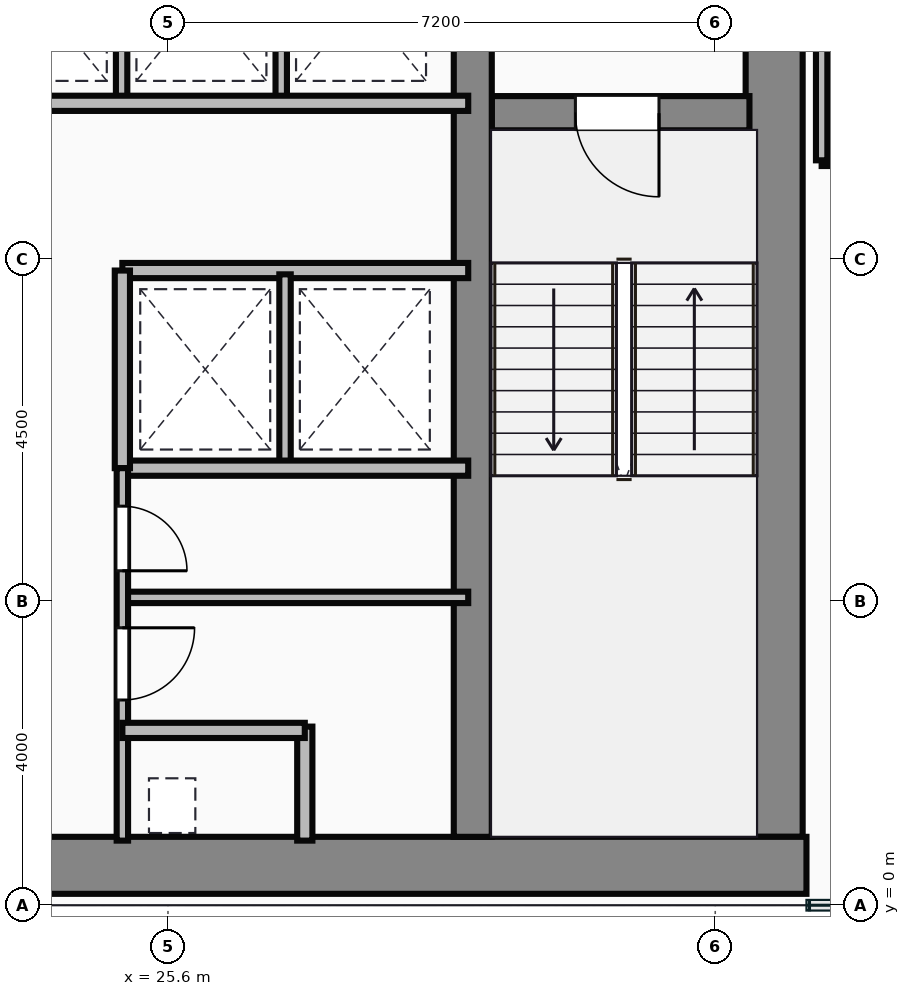
"""IFC4 building model, lengths in metres.
Left out: names, types, materials, properties, quantities, classifications, styles, units other than length and angle.
Written with IfcOpenShell. Run it as: python <this file> out.ifc"""

import sys

from ifc_helpers import new_model, si_unit, direction, frame, frame_2d, origin, place, context, subcontext, project, spatial, rectangle, extrude, source, transform, mapped, element, fill, save


model = new_model("IFC4")
c1 = context("Model", 3, precision=1e-05, world=origin(), true_north=direction((0.0, 1.0)))
c2 = subcontext(c1, "Body", "Model", "MODEL_VIEW")
j1 = project(units=[si_unit("LENGTHUNIT", "METRE"), si_unit("PLANEANGLEUNIT", "RADIAN")], contexts=[c1])
p1 = place(None, origin())
s1 = spatial("IfcSite", under=j1, at=p1, CompositionType="ELEMENT")
p2 = place(p1, origin())
s2 = spatial("IfcBuilding", under=s1, at=p2, CompositionType="ELEMENT")
p3 = place(p2, frame((0.0, 0.0, 103.25)))
s3 = spatial("IfcBuildingStorey", under=s2, at=p3, CompositionType="ELEMENT", Elevation=103.25)
m1 = source(origin(), c2, "Body", "SweptSolid", [
    extrude(rectangle(XDim=29.5, YDim=0.75, at=frame_2d((14.75, 0.0))), origin(), (0.0, 0.0, 1.0), 3.65),
])
p4 = place(p3, frame((4.5, 0.525, 0.0), z_axis=(0.0, 0.0, 1.0), x_axis=(1.0, 0.0, 0.0)))
e1 = element("IfcWall", 1, at=p4, inside=s3, PredefinedType="SHEAR", context=c2, shape_type="MappedRepresentation", body=[
    mapped(m1, transform((0.0, 0.0, 0.0))),
])
m2 = source(origin(), c2, "Body", "SweptSolid", [
    extrude(rectangle(XDim=13.1, YDim=0.75, at=frame_2d((6.55, 0.0))), origin(), (0.0, 0.0, 1.0), 3.65),
])
p5 = place(p3, frame((33.575, 0.9, 0.0), z_axis=(0.0, 0.0, 1.0), x_axis=(0.0, 1.0, 0.0)))
e2 = element("IfcWall", 2, at=p5, inside=s3, PredefinedType="SHEAR", context=c2, shape_type="MappedRepresentation", body=[
    mapped(m2, transform((0.0, 0.0, 0.0))),
])
m3 = source(origin(), c2, "Body", "SweptSolid", [
    extrude(rectangle(XDim=12.35, YDim=0.5, at=frame_2d((6.175, 0.0))), origin(), (0.0, 0.0, 1.0), 3.65),
])
p6 = place(p3, frame((29.61, 0.9, 0.0), z_axis=(0.0, 0.0, 1.0), x_axis=(0.0, 1.0, 0.0)))
e3 = element("IfcWall", 3, at=p6, inside=s3, PredefinedType="SHEAR", context=c2, shape_type="MappedRepresentation", body=[
    mapped(m3, transform((0.0, 0.0, 0.0))),
])
m4 = source(origin(), c2, "Body", "SweptSolid", [
    extrude(rectangle(XDim=3.39, YDim=0.45, at=frame_2d((1.695, 0.0))), origin(), (0.0, 0.0, 1.0), 3.65),
])
p7 = place(p3, frame((29.86, 10.42, 0.0), z_axis=(0.0, 0.0, 1.0), x_axis=(1.0, 0.0, 0.0)))
e4 = element("IfcWall", 4, at=p7, inside=s3, PredefinedType="SHEAR", context=c2, shape_type="MappedRepresentation", body=[
    mapped(m4, transform((0.0, 0.0, 0.0))),
])
p8 = place(p7, frame((1.1, 0.0, 0.0)))
e5 = element("IfcOpeningElement", 5, at=p8, cuts=e4, PredefinedType="OPENING", context=c2, shape_type="SweptSolid", body=[
    extrude(rectangle(XDim=1.1, YDim=2.15, at=frame_2d((0.55, 1.075))), frame((0.0, 0.235, 0.0), z_axis=(0.0, -1.0, 0.0), x_axis=(1.0, 0.0, 0.0)), (0.0, 0.0, 1.0), 0.47),
])
m5 = source(origin(), c2, "Body", "SweptSolid", [
    extrude(rectangle(XDim=8.8, YDim=0.2, at=frame_2d((4.4, 0.0))), origin(), (0.0, 0.0, 1.0), 3.4),
])
p9 = place(p3, frame((20.75, 10.55, 0.0), z_axis=(0.0, 0.0, 1.0), x_axis=(1.0, 0.0, 0.0)))
e6 = element("IfcWall", 6, at=p9, inside=s3, PredefinedType="PARTITIONING", context=c2, shape_type="MappedRepresentation", body=[
    mapped(m5, transform((0.0, 0.0, 0.0))),
])
m6 = source(origin(), c2, "Body", "SweptSolid", [
    extrude(rectangle(XDim=2.85, YDim=0.15, at=frame_2d((1.425, 0.0))), origin(), (0.0, 0.0, 1.0), 3.4),
])
for number, where, z_axis, x_axis in (
    (7, (24.99, 10.6, 0.0), (0.0, 0.0, 1.0), (0.0, 1.0, 0.0)),
    (8, (27.09, 10.6, 0.0), (0.0, 0.0, 1.0), (0.0, 1.0, 0.0)),
):
    element("IfcWall", number, at=place(p3, frame(where, z_axis=z_axis, x_axis=x_axis)), inside=s3, PredefinedType="PARTITIONING", context=c2, shape_type="MappedRepresentation", body=[
        mapped(m6, transform((0.0, 0.0, 0.0))),
    ])
m7 = source(origin(), c2, "Body", "SweptSolid", [
    extrude(rectangle(XDim=4.55, YDim=0.2, at=frame_2d((2.275, 0.0))), origin(), (0.0, 0.0, 1.0), 3.4),
])
for number, where, z_axis, x_axis in (
    (9, (25.0, 8.35, 0.0), (0.0, 0.0, 1.0), (1.0, 0.0, 0.0)),
    (10, (25.0, 5.75, 0.0), (0.0, 0.0, 1.0), (1.0, 0.0, 0.0)),
):
    element("IfcWall", number, at=place(p3, frame(where, z_axis=z_axis, x_axis=x_axis)), inside=s3, PredefinedType="PARTITIONING", context=c2, shape_type="MappedRepresentation", body=[
        mapped(m7, transform((0.0, 0.0, 0.0))),
    ])
m8 = source(origin(), c2, "Body", "SweptSolid", [
    extrude(rectangle(XDim=2.6, YDim=0.2, at=frame_2d((1.3, 0.0))), origin(), (0.0, 0.0, 1.0), 3.4),
])
p10 = place(p3, frame((25.0, 5.75, 0.0), z_axis=(0.0, 0.0, 1.0), x_axis=(0.0, 1.0, 0.0)))
e11 = element("IfcWall", 11, at=p10, inside=s3, PredefinedType="PARTITIONING", context=c2, shape_type="MappedRepresentation", body=[
    mapped(m8, transform((0.0, 0.0, 0.0))),
])
m9 = source(origin(), c2, "Body", "SweptSolid", [
    extrude(rectangle(XDim=2.5, YDim=0.15, at=frame_2d((1.25, 0.0))), origin(), (0.0, 0.0, 1.0), 3.4),
])
p11 = place(p3, frame((27.14, 5.8, 0.0), z_axis=(0.0, 0.0, 1.0), x_axis=(0.0, 1.0, 0.0)))
e12 = element("IfcWall", 12, at=p11, inside=s3, PredefinedType="PARTITIONING", context=c2, shape_type="MappedRepresentation", body=[
    mapped(m9, transform((0.0, 0.0, 0.0))),
])
m10 = source(origin(), c2, "Body", "SweptSolid", [
    extrude(rectangle(XDim=4.9, YDim=0.15, at=frame_2d((2.45, 0.0))), origin(), (0.0, 0.0, 1.0), 3.4),
])
p12 = place(p3, frame((25.0, 0.85, 0.0), z_axis=(0.0, 0.0, 1.0), x_axis=(0.0, 1.0, 0.0)))
e13 = element("IfcWall", 13, at=p12, inside=s3, PredefinedType="PARTITIONING", context=c2, shape_type="MappedRepresentation", body=[
    mapped(m10, transform((0.0, 0.0, 0.0))),
])
p13 = place(p12, frame((1.85, 0.0, 0.0)))
e14 = element("IfcOpeningElement", 14, at=p13, cuts=e13, PredefinedType="OPENING", context=c2, shape_type="SweptSolid", body=[
    extrude(rectangle(XDim=0.95, YDim=2.15, at=frame_2d((0.475, 1.075))), frame((0.0, 0.085, 0.0), z_axis=(0.0, -1.0, 0.0), x_axis=(1.0, 0.0, 0.0)), (0.0, 0.0, 1.0), 0.17),
])
p14 = place(p12, frame((3.55, 0.0, 0.0)))
e15 = element("IfcOpeningElement", 15, at=p14, cuts=e13, PredefinedType="OPENING", context=c2, shape_type="SweptSolid", body=[
    extrude(rectangle(XDim=0.85, YDim=2.15, at=frame_2d((0.425, 1.075))), frame((0.0, 0.085, 0.0), z_axis=(0.0, -1.0, 0.0), x_axis=(1.0, 0.0, 0.0)), (0.0, 0.0, 1.0), 0.17),
])
m11 = source(origin(), c2, "Body", "SweptSolid", [
    extrude(rectangle(XDim=2.4, YDim=0.2, at=frame_2d((1.2, 0.0))), origin(), (0.0, 0.0, 1.0), 3.4),
])
p15 = place(p3, frame((25.0, 2.3, 0.0), z_axis=(0.0, 0.0, 1.0), x_axis=(1.0, 0.0, 0.0)))
e16 = element("IfcWall", 16, at=p15, inside=s3, PredefinedType="PARTITIONING", context=c2, shape_type="MappedRepresentation", body=[
    mapped(m11, transform((0.0, 0.0, 0.0))),
])
m12 = source(origin(), c2, "Body", "SweptSolid", [
    extrude(rectangle(XDim=1.5, YDim=0.2, at=frame_2d((0.75, 0.0))), origin(), (0.0, 0.0, 1.0), 3.4),
])
p16 = place(p3, frame((27.4, 0.85, 0.0), z_axis=(0.0, 0.0, 1.0), x_axis=(0.0, 1.0, 0.0)))
e17 = element("IfcWall", 17, at=p16, inside=s3, PredefinedType="PARTITIONING", context=c2, shape_type="MappedRepresentation", body=[
    mapped(m12, transform((0.0, 0.0, 0.0))),
])
m13 = source(origin(), c2, "Body", "SweptSolid", [
    extrude(rectangle(XDim=4.55, YDim=0.15, at=frame_2d((2.275, 0.0))), origin(), (0.0, 0.0, 1.0), 3.4),
])
p17 = place(p3, frame((25.0, 4.05, 0.0), z_axis=(0.0, 0.0, 1.0), x_axis=(1.0, 0.0, 0.0)))
e18 = element("IfcWall", 18, at=p17, inside=s3, PredefinedType="PARTITIONING", context=c2, shape_type="MappedRepresentation", body=[
    mapped(m13, transform((0.0, 0.0, 0.0))),
])
m14 = source(origin(), c2, "Body", "SweptSolid", [
    extrude(rectangle(XDim=4.8, YDim=0.15, at=frame_2d((2.4, 0.0))), origin(), (0.0, 0.0, 1.0), 3.4),
])
p18 = place(p3, frame((34.2, 9.8, 0.0), z_axis=(0.0, 0.0, 1.0), x_axis=(1.0, 0.0, 0.0)))
e19 = element("IfcWall", 19, at=p18, inside=s3, PredefinedType="PARTITIONING", context=c2, shape_type="MappedRepresentation", body=[
    mapped(m14, transform((0.0, 0.0, 0.0))),
])
m15 = source(origin(), c2, "Body", "SweptSolid", [
    extrude(rectangle(XDim=4.18, YDim=0.15, at=frame_2d((2.09, 0.0))), origin(), (0.0, 0.0, 1.0), 3.4),
])
p19 = place(p3, frame((34.2, 9.8, 0.0), z_axis=(0.0, 0.0, 1.0), x_axis=(0.0, 1.0, 0.0)))
e20 = element("IfcWall", 20, at=p19, inside=s3, PredefinedType="PARTITIONING", context=c2, shape_type="MappedRepresentation", body=[
    mapped(m15, transform((0.0, 0.0, 0.0))),
])
m16 = source(origin(), c2, "Body", "SweptSolid", [
    extrude(rectangle(XDim=1.1, YDim=2.15, at=frame_2d((0.55, 1.075))), frame((0.0, 0.025, 0.0), z_axis=(0.0, -1.0, 0.0), x_axis=(1.0, 0.0, 0.0)), (0.0, 0.0, 1.0), 0.05),
])
p20 = place(p8, frame((1.1, 0.0, 0.0), z_axis=(0.0, 0.0, 1.0), x_axis=(-1.0, 0.0, 0.0)))
e21 = element("IfcDoor", 21, at=p20, inside=s3, OperationType="SINGLE_SWING_RIGHT", PredefinedType="DOOR", context=c2, shape_type="MappedRepresentation", body=[
    mapped(m16, transform((0.0, 0.0, 0.0))),
])
fill(e5, e21)
m17 = source(origin(), c2, "Body", "SweptSolid", [
    extrude(rectangle(XDim=0.95, YDim=2.15, at=frame_2d((0.475, 1.075))), frame((0.0, 0.025, 0.0), z_axis=(0.0, -1.0, 0.0), x_axis=(1.0, 0.0, 0.0)), (0.0, 0.0, 1.0), 0.05),
])
p21 = place(p13, origin())
e22 = element("IfcDoor", 22, at=p21, inside=s3, OperationType="SINGLE_SWING_RIGHT", PredefinedType="DOOR", context=c2, shape_type="MappedRepresentation", body=[
    mapped(m17, transform((0.0, 0.0, 0.0))),
])
fill(e14, e22)
m18 = source(origin(), c2, "Body", "SweptSolid", [
    extrude(rectangle(XDim=0.85, YDim=2.15, at=frame_2d((0.425, 1.075))), frame((0.0, 0.025, 0.0), z_axis=(0.0, -1.0, 0.0), x_axis=(1.0, 0.0, 0.0)), (0.0, 0.0, 1.0), 0.05),
])
p22 = place(p14, origin())
e23 = element("IfcDoor", 23, at=p22, inside=s3, OperationType="SINGLE_SWING_LEFT", PredefinedType="DOOR", context=c2, shape_type="MappedRepresentation", body=[
    mapped(m18, transform((0.0, 0.0, 0.0))),
])
fill(e15, e23)
save(model, sys.argv[1])
